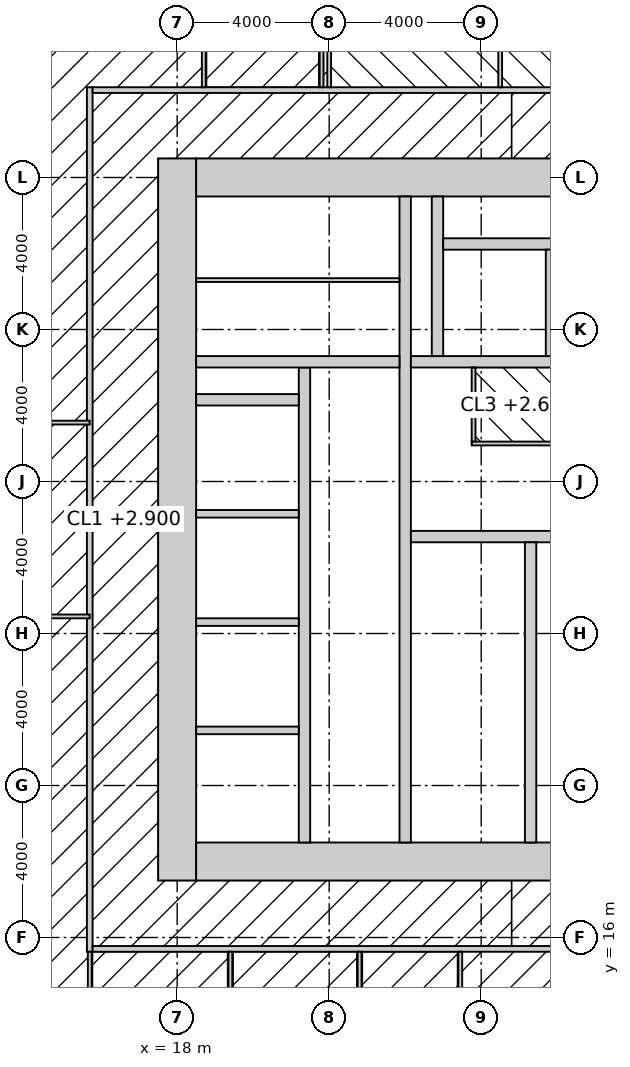
"""IFC4 building model, lengths in metres.
Left out: names, types, materials, properties, quantities, classifications, styles, units other than length and angle.
Written with IfcOpenShell. Run it as: python <this file> out.ifc"""

import sys

from ifc_helpers import new_model, si_unit, direction, frame, frame_2d, origin, place, context, subcontext, project, spatial, rectangle, extrude, element, fill, save


model = new_model("IFC4")
c1 = context("Model", 3, precision=1e-05, world=origin(), true_north=direction((0.0, 1.0)))
c2 = subcontext(c1, "Body", "Model", "MODEL_VIEW")
j1 = project(units=[si_unit("LENGTHUNIT", "METRE"), si_unit("PLANEANGLEUNIT", "RADIAN")], contexts=[c1])
p1 = place(None, origin())
s1 = spatial("IfcSite", under=j1, at=p1, CompositionType="ELEMENT")
p2 = place(p1, origin())
s2 = spatial("IfcBuilding", under=s1, at=p2, CompositionType="ELEMENT")
p3 = place(p2, frame((0.0, 0.0, 93.4)))
s3 = spatial("IfcBuildingStorey", under=s2, at=p3, CompositionType="ELEMENT", Elevation=93.4)
p4 = place(p3, frame((18.0, 17.5, -0.15), z_axis=(0.0, 0.0, 1.0), x_axis=(0.0, 1.0, 0.0)))
e1 = element("IfcWall", 1, at=p4, inside=s3, PredefinedType="SHEAR", context=c2, shape_type="SweptSolid", body=[
    extrude(rectangle(XDim=19.0, YDim=1.0, at=frame_2d((9.5, 0.0))), origin(), (0.0, 0.0, 1.0), 4.0),
])
p5 = place(p3, frame((18.5, 18.0, -0.15), z_axis=(0.0, 0.0, 1.0), x_axis=(1.0, 0.0, 0.0)))
e2 = element("IfcWall", 2, at=p5, inside=s3, PredefinedType="SHEAR", context=c2, shape_type="SweptSolid", body=[
    extrude(rectangle(XDim=17.6, YDim=1.0, at=frame_2d((8.8, 0.0))), origin(), (0.0, 0.0, 1.0), 4.0),
])
p6 = place(p5, frame((3.45, 0.0, 0.15)))
e3 = element("IfcOpeningElement", 3, at=p6, cuts=e2, PredefinedType="OPENING", context=c2, shape_type="SweptSolid", body=[
    extrude(rectangle(XDim=1.5, YDim=2.4, at=frame_2d((0.75, 1.2))), frame((0.0, 0.51, 0.0), z_axis=(0.0, -1.0, 0.0), x_axis=(1.0, 0.0, 0.0)), (0.0, 0.0, 1.0), 1.02),
])
p7 = place(p3, frame((18.5, 36.0, -0.15), z_axis=(0.0, 0.0, 1.0), x_axis=(1.0, 0.0, 0.0)))
e4 = element("IfcWall", 4, at=p7, inside=s3, PredefinedType="SHEAR", context=c2, shape_type="SweptSolid", body=[
    extrude(rectangle(XDim=17.6, YDim=1.0, at=frame_2d((8.8, 0.0))), origin(), (0.0, 0.0, 1.0), 4.0),
])
p8 = place(p3, frame((24.0, 18.5, -0.15), z_axis=(0.0, 0.0, 1.0), x_axis=(0.0, 1.0, 0.0)))
e5 = element("IfcWall", 5, at=p8, inside=s3, PredefinedType="SHEAR", context=c2, shape_type="SweptSolid", body=[
    extrude(rectangle(XDim=17.0, YDim=0.3, at=frame_2d((8.5, 0.0))), origin(), (0.0, 0.0, 1.0), 4.0),
])
p9 = place(p8, frame((9.6, 0.0, 0.15)))
e6 = element("IfcOpeningElement", 6, at=p9, cuts=e5, PredefinedType="OPENING", context=c2, shape_type="SweptSolid", body=[
    extrude(rectangle(XDim=1.5, YDim=2.4, at=frame_2d((0.75, 1.2))), frame((0.0, 0.16, 0.0), z_axis=(0.0, -1.0, 0.0), x_axis=(1.0, 0.0, 0.0)), (0.0, 0.0, 1.0), 0.32),
])
p10 = place(p3, frame((24.15, 26.55, -0.15), z_axis=(0.0, 0.0, 1.0), x_axis=(1.0, 0.0, 0.0)))
e7 = element("IfcWall", 7, at=p10, inside=s3, PredefinedType="SHEAR", context=c2, shape_type="SweptSolid", body=[
    extrude(rectangle(XDim=11.25, YDim=0.3, at=frame_2d((5.625, 0.0))), origin(), (0.0, 0.0, 1.0), 4.0),
])
p11 = place(p10, frame((9.25, 0.0, 0.15)))
e8 = element("IfcOpeningElement", 8, at=p11, cuts=e7, PredefinedType="OPENING", context=c2, shape_type="SweptSolid", body=[
    extrude(rectangle(XDim=1.0, YDim=2.2, at=frame_2d((0.5, 1.1))), frame((0.0, 0.16, 0.0), z_axis=(0.0, -1.0, 0.0), x_axis=(1.0, 0.0, 0.0)), (0.0, 0.0, 1.0), 0.32),
])
p12 = place(p10, frame((4.9, 0.0, 0.15)))
e9 = element("IfcOpeningElement", 9, at=p12, cuts=e7, PredefinedType="OPENING", context=c2, shape_type="SweptSolid", body=[
    extrude(rectangle(XDim=1.5, YDim=2.4, at=frame_2d((0.75, 1.2))), frame((0.0, 0.16, 0.0), z_axis=(0.0, -1.0, 0.0), x_axis=(1.0, 0.0, 0.0)), (0.0, 0.0, 1.0), 0.32),
])
p13 = place(p3, frame((27.3, 18.5, -0.15), z_axis=(0.0, 0.0, 1.0), x_axis=(0.0, 1.0, 0.0)))
e10 = element("IfcWall", 10, at=p13, inside=s3, PredefinedType="SHEAR", context=c2, shape_type="SweptSolid", body=[
    extrude(rectangle(XDim=7.9, YDim=0.3, at=frame_2d((3.95, 0.0))), origin(), (0.0, 0.0, 1.0), 4.0),
])
p14 = place(p13, frame((6.4, 0.0, 0.15)))
e11 = element("IfcOpeningElement", 11, at=p14, cuts=e10, PredefinedType="OPENING", context=c2, shape_type="SweptSolid", body=[
    extrude(rectangle(XDim=1.0, YDim=2.2, at=frame_2d((0.5, 1.1))), frame((0.0, 0.16, 0.0), z_axis=(0.0, -1.0, 0.0), x_axis=(1.0, 0.0, 0.0)), (0.0, 0.0, 1.0), 0.32),
])
p15 = place(p3, frame((24.15, 31.15, -0.15), z_axis=(0.0, 0.0, 1.0), x_axis=(1.0, 0.0, 0.0)))
e12 = element("IfcWall", 12, at=p15, inside=s3, PredefinedType="SHEAR", context=c2, shape_type="SweptSolid", body=[
    extrude(rectangle(XDim=11.25, YDim=0.3, at=frame_2d((5.625, 0.0))), origin(), (0.0, 0.0, 1.0), 4.0),
])
p16 = place(p15, frame((7.25, 0.0, 0.15)))
e13 = element("IfcOpeningElement", 13, at=p16, cuts=e12, PredefinedType="OPENING", context=c2, shape_type="SweptSolid", body=[
    extrude(rectangle(XDim=1.4, YDim=2.4, at=frame_2d((0.7, 1.2))), frame((0.0, 0.16, 0.0), z_axis=(0.0, -1.0, 0.0), x_axis=(1.0, 0.0, 0.0)), (0.0, 0.0, 1.0), 0.32),
])
p17 = place(p3, frame((21.35, 18.5, -0.15), z_axis=(0.0, 0.0, 1.0), x_axis=(0.0, 1.0, 0.0)))
e14 = element("IfcWall", 14, at=p17, inside=s3, PredefinedType="SHEAR", context=c2, shape_type="SweptSolid", body=[
    extrude(rectangle(XDim=12.5, YDim=0.3, at=frame_2d((6.25, 0.0))), origin(), (0.0, 0.0, 1.0), 4.0),
])
p18 = place(p17, frame((0.875, 0.0, 0.15)))
e15 = element("IfcOpeningElement", 15, at=p18, cuts=e14, PredefinedType="OPENING", context=c2, shape_type="SweptSolid", body=[
    extrude(rectangle(XDim=1.1, YDim=2.2, at=frame_2d((0.55, 1.1))), frame((0.0, 0.16, 0.0), z_axis=(0.0, -1.0, 0.0), x_axis=(1.0, 0.0, 0.0)), (0.0, 0.0, 1.0), 0.32),
])
p19 = place(p17, frame((3.825, 0.0, 0.15)))
e16 = element("IfcOpeningElement", 16, at=p19, cuts=e14, PredefinedType="OPENING", context=c2, shape_type="SweptSolid", body=[
    extrude(rectangle(XDim=1.1, YDim=2.2, at=frame_2d((0.55, 1.1))), frame((0.0, 0.16, 0.0), z_axis=(0.0, -1.0, 0.0), x_axis=(1.0, 0.0, 0.0)), (0.0, 0.0, 1.0), 0.32),
])
p20 = place(p17, frame((6.675, 0.0, 0.15)))
e17 = element("IfcOpeningElement", 17, at=p20, cuts=e14, PredefinedType="OPENING", context=c2, shape_type="SweptSolid", body=[
    extrude(rectangle(XDim=1.1, YDim=2.2, at=frame_2d((0.55, 1.1))), frame((0.0, 0.16, 0.0), z_axis=(0.0, -1.0, 0.0), x_axis=(1.0, 0.0, 0.0)), (0.0, 0.0, 1.0), 0.32),
])
p21 = place(p17, frame((9.575, 0.0, 0.15)))
e18 = element("IfcOpeningElement", 18, at=p21, cuts=e14, PredefinedType="OPENING", context=c2, shape_type="SweptSolid", body=[
    extrude(rectangle(XDim=1.1, YDim=2.2, at=frame_2d((0.55, 1.1))), frame((0.0, 0.16, 0.0), z_axis=(0.0, -1.0, 0.0), x_axis=(1.0, 0.0, 0.0)), (0.0, 0.0, 1.0), 0.32),
])
p22 = place(p3, frame((18.5, 31.15, -0.15), z_axis=(0.0, 0.0, 1.0), x_axis=(1.0, 0.0, 0.0)))
e19 = element("IfcWall", 19, at=p22, inside=s3, PredefinedType="SHEAR", context=c2, shape_type="SweptSolid", body=[
    extrude(rectangle(XDim=5.35, YDim=0.3, at=frame_2d((2.675, 0.0))), origin(), (0.0, 0.0, 1.0), 4.0),
])
p23 = place(p22, frame((3.4, 0.0, 0.15)))
e20 = element("IfcOpeningElement", 20, at=p23, cuts=e19, PredefinedType="OPENING", context=c2, shape_type="SweptSolid", body=[
    extrude(rectangle(XDim=1.0, YDim=2.2, at=frame_2d((0.5, 1.1))), frame((0.0, 0.16, 0.0), z_axis=(0.0, -1.0, 0.0), x_axis=(1.0, 0.0, 0.0)), (0.0, 0.0, 1.0), 0.32),
])
p24 = place(p3, frame((18.5, 30.15, -0.15), z_axis=(0.0, 0.0, 1.0), x_axis=(1.0, 0.0, 0.0)))
e21 = element("IfcWall", 21, at=p24, inside=s3, PredefinedType="SHEAR", context=c2, shape_type="SweptSolid", body=[
    extrude(rectangle(XDim=2.7, YDim=0.3, at=frame_2d((1.35, 0.0))), origin(), (0.0, 0.0, 1.0), 4.0),
])
p25 = place(p3, frame((24.85, 31.3, -0.15), z_axis=(0.0, 0.0, 1.0), x_axis=(0.0, 1.0, 0.0)))
e22 = element("IfcWall", 22, at=p25, inside=s3, PredefinedType="SHEAR", context=c2, shape_type="SweptSolid", body=[
    extrude(rectangle(XDim=4.2, YDim=0.3, at=frame_2d((2.1, 0.0))), origin(), (0.0, 0.0, 1.0), 4.0),
])
p26 = place(p3, frame((25.0, 34.25, -0.15), z_axis=(0.0, 0.0, 1.0), x_axis=(1.0, 0.0, 0.0)))
e23 = element("IfcWall", 23, at=p26, inside=s3, PredefinedType="SHEAR", context=c2, shape_type="SweptSolid", body=[
    extrude(rectangle(XDim=8.6, YDim=0.3, at=frame_2d((4.3, 0.0))), origin(), (0.0, 0.0, 1.0), 4.0),
])
p27 = place(p3, frame((27.8, 31.3, -0.15), z_axis=(0.0, 0.0, 1.0), x_axis=(0.0, 1.0, 0.0)))
e24 = element("IfcWall", 24, at=p27, inside=s3, PredefinedType="SOLIDWALL", context=c2, shape_type="SweptSolid", body=[
    extrude(rectangle(XDim=2.8, YDim=0.2, at=frame_2d((1.4, 0.0))), origin(), (0.0, 0.0, 1.0), 4.0),
])
for number, where, z_axis, x_axis in (
    (25, (18.5, 21.45, -0.15), (0.0, 0.0, 1.0), (1.0, 0.0, 0.0)),
    (26, (18.5, 24.3, -0.15), (0.0, 0.0, 1.0), (1.0, 0.0, 0.0)),
    (27, (18.5, 27.15, -0.15), (0.0, 0.0, 1.0), (1.0, 0.0, 0.0)),
):
    element("IfcWall", number, at=place(p3, frame(where, z_axis=z_axis, x_axis=x_axis)), inside=s3, PredefinedType="SOLIDWALL", context=c2, shape_type="SweptSolid", body=[
        extrude(rectangle(XDim=2.7, YDim=0.2, at=frame_2d((1.35, 0.0))), origin(), (0.0, 0.0, 1.0), 4.0),
    ])
p28 = place(p3, frame((18.5, 33.3, 0.0), z_axis=(0.0, 0.0, 1.0), x_axis=(1.0, 0.0, 0.0)))
e28 = element("IfcWall", 28, at=p28, inside=s3, PredefinedType="PARTITIONING", context=c2, shape_type="SweptSolid", body=[
    extrude(rectangle(XDim=5.35, YDim=0.1, at=frame_2d((2.675, 0.0))), origin(), (0.0, 0.0, 1.0), 3.85),
])
p29 = place(p28, frame((1.2, 0.0, 0.0)))
e29 = element("IfcOpeningElement", 29, at=p29, cuts=e28, PredefinedType="OPENING", context=c2, shape_type="SweptSolid", body=[
    extrude(rectangle(XDim=1.0, YDim=2.2, at=frame_2d((0.5, 1.1))), frame((0.0, 0.06, 0.0), z_axis=(0.0, -1.0, 0.0), x_axis=(1.0, 0.0, 0.0)), (0.0, 0.0, 1.0), 0.12),
])
p30 = place(p3, frame((25.75, 29.0, 0.0), z_axis=(0.0, 0.0, 1.0), x_axis=(1.0, 0.0, 0.0)))
e30 = element("IfcWall", 30, at=p30, inside=s3, PredefinedType="PARTITIONING", context=c2, shape_type="SweptSolid", body=[
    extrude(rectangle(XDim=4.7, YDim=0.1, at=frame_2d((2.35, 0.0))), origin(), (0.0, 0.0, 1.0), 3.85),
])
p31 = place(p30, frame((0.7, 0.0, 0.0)))
e31 = element("IfcOpeningElement", 31, at=p31, cuts=e30, PredefinedType="OPENING", context=c2, shape_type="SweptSolid", body=[
    extrude(rectangle(XDim=1.0, YDim=2.2, at=frame_2d((0.5, 1.1))), frame((0.0, 0.06, 0.0), z_axis=(0.0, -1.0, 0.0), x_axis=(1.0, 0.0, 0.0)), (0.0, 0.0, 1.0), 0.12),
])
p32 = place(p30, frame((3.0, 0.0, 0.0)))
e32 = element("IfcOpeningElement", 32, at=p32, cuts=e30, PredefinedType="OPENING", context=c2, shape_type="SweptSolid", body=[
    extrude(rectangle(XDim=1.0, YDim=2.2, at=frame_2d((0.5, 1.1))), frame((0.0, 0.06, 0.0), z_axis=(0.0, -1.0, 0.0), x_axis=(1.0, 0.0, 0.0)), (0.0, 0.0, 1.0), 0.12),
])
p33 = place(p3, frame((25.8, 29.05, 0.0), z_axis=(0.0, 0.0, 1.0), x_axis=(0.0, 1.0, 0.0)))
e33 = element("IfcWall", 33, at=p33, inside=s3, PredefinedType="PARTITIONING", context=c2, shape_type="SweptSolid", body=[
    extrude(rectangle(XDim=1.95, YDim=0.1, at=frame_2d((0.975, 0.0))), origin(), (0.0, 0.0, 1.0), 3.85),
])
p34 = place(p3, frame((15.7, 15.625, 0.0), z_axis=(0.0, 0.0, 1.0), x_axis=(0.0, 1.0, 0.0)))
e34 = element("IfcWall", 34, at=p34, inside=s3, PredefinedType="PARTITIONING", context=c2, shape_type="SweptSolid", body=[
    extrude(rectangle(XDim=22.75, YDim=0.15, at=frame_2d((11.375, 0.0))), origin(), (0.0, 0.0, 1.0), 3.85),
])
p35 = place(p34, frame((10.475, 0.0, 0.0)))
e35 = element("IfcOpeningElement", 35, at=p35, cuts=e34, PredefinedType="OPENING", context=c2, shape_type="SweptSolid", body=[
    extrude(rectangle(XDim=1.8, YDim=2.4, at=frame_2d((0.9, 1.2))), frame((0.0, 0.085, 0.0), z_axis=(0.0, -1.0, 0.0), x_axis=(1.0, 0.0, 0.0)), (0.0, 0.0, 1.0), 0.17),
])
p36 = place(p3, frame((15.775, 15.7, 0.0), z_axis=(0.0, 0.0, 1.0), x_axis=(1.0, 0.0, 0.0)))
e36 = element("IfcWall", 36, at=p36, inside=s3, PredefinedType="PARTITIONING", context=c2, shape_type="SweptSolid", body=[
    extrude(rectangle(XDim=22.05, YDim=0.15, at=frame_2d((11.025, 0.0))), origin(), (0.0, 0.0, 1.0), 3.85),
])
p37 = place(p3, frame((15.775, 38.3, 0.0), z_axis=(0.0, 0.0, 1.0), x_axis=(1.0, 0.0, 0.0)))
e37 = element("IfcWall", 37, at=p37, inside=s3, PredefinedType="PARTITIONING", context=c2, shape_type="SweptSolid", body=[
    extrude(rectangle(XDim=22.05, YDim=0.15, at=frame_2d((11.025, 0.0))), origin(), (0.0, 0.0, 1.0), 3.85),
])
p38 = place(p37, frame((7.975, 0.0, 0.0)))
e38 = element("IfcOpeningElement", 38, at=p38, cuts=e37, PredefinedType="OPENING", context=c2, shape_type="SweptSolid", body=[
    extrude(rectangle(XDim=0.9, YDim=2.1, at=frame_2d((0.45, 1.05))), frame((0.0, 0.085, 0.0), z_axis=(0.0, -1.0, 0.0), x_axis=(1.0, 0.0, 0.0)), (0.0, 0.0, 1.0), 0.17),
])
p39 = place(p37, frame((11.725, 0.0, 0.0)))
e39 = element("IfcOpeningElement", 39, at=p39, cuts=e37, PredefinedType="OPENING", context=c2, shape_type="SweptSolid", body=[
    extrude(rectangle(XDim=1.0, YDim=2.1, at=frame_2d((0.5, 1.05))), frame((0.0, 0.085, 0.0), z_axis=(0.0, -1.0, 0.0), x_axis=(1.0, 0.0, 0.0)), (0.0, 0.0, 1.0), 0.17),
])
p40 = place(p37, frame((15.575, 0.0, 0.0)))
e40 = element("IfcOpeningElement", 40, at=p40, cuts=e37, PredefinedType="OPENING", context=c2, shape_type="SweptSolid", body=[
    extrude(rectangle(XDim=0.9, YDim=2.1, at=frame_2d((0.45, 1.05))), frame((0.0, 0.085, 0.0), z_axis=(0.0, -1.0, 0.0), x_axis=(1.0, 0.0, 0.0)), (0.0, 0.0, 1.0), 0.17),
])
p41 = place(p3, frame((22.0, 38.375, 0.0), z_axis=(0.0, 0.0, 1.0), x_axis=(0.0, 1.0, 0.0)))
e41 = element("IfcWall", 41, at=p41, inside=s3, PredefinedType="PARTITIONING", context=c2, shape_type="SweptSolid", body=[
    extrude(rectangle(XDim=3.675, YDim=0.1, at=frame_2d((1.837, 0.0))), origin(), (0.0, 0.0, 1.0), 2.95),
])
p42 = place(p3, frame((26.5, 38.375, 0.0), z_axis=(0.0, 0.0, 1.0), x_axis=(0.0, 1.0, 0.0)))
e42 = element("IfcWall", 42, at=p42, inside=s3, PredefinedType="PARTITIONING", context=c2, shape_type="SweptSolid", body=[
    extrude(rectangle(XDim=3.575, YDim=0.1, at=frame_2d((1.788, 0.0))), origin(), (0.0, 0.0, 1.0), 3.85),
])
p43 = place(p3, frame((15.7, 11.55, 0.0), z_axis=(0.0, 0.0, 1.0), x_axis=(0.0, 1.0, 0.0)))
e43 = element("IfcWall", 43, at=p43, inside=s3, PredefinedType="PARTITIONING", context=c2, shape_type="SweptSolid", body=[
    extrude(rectangle(XDim=4.075, YDim=0.1, at=frame_2d((2.038, 0.0))), origin(), (0.0, 0.0, 1.0), 3.85),
])
p44 = place(p3, frame((18.7, 38.375, 0.0), z_axis=(0.0, 0.0, 1.0), x_axis=(0.0, 1.0, 0.0)))
e44 = element("IfcWall", 44, at=p44, inside=s3, PredefinedType="PARTITIONING", context=c2, shape_type="SweptSolid", body=[
    extrude(rectangle(XDim=3.475, YDim=0.1, at=frame_2d((1.738, 0.0))), origin(), (0.0, 0.0, 1.0), 3.85),
])
p45 = place(p3, frame((19.4, 11.55, 0.0), z_axis=(0.0, 0.0, 1.0), x_axis=(0.0, 1.0, 0.0)))
e45 = element("IfcWall", 45, at=p45, inside=s3, PredefinedType="PARTITIONING", context=c2, shape_type="SweptSolid", body=[
    extrude(rectangle(XDim=4.075, YDim=0.1, at=frame_2d((2.038, 0.0))), origin(), (0.0, 0.0, 1.0), 3.85),
])
p46 = place(p3, frame((21.8, 38.375, 0.0), z_axis=(0.0, 0.0, 1.0), x_axis=(0.0, 1.0, 0.0)))
e46 = element("IfcWall", 46, at=p46, inside=s3, PredefinedType="PARTITIONING", context=c2, shape_type="SweptSolid", body=[
    extrude(rectangle(XDim=3.475, YDim=0.1, at=frame_2d((1.738, 0.0))), origin(), (0.0, 0.0, 1.0), 3.85),
])
for number, where, z_axis, x_axis in (
    (47, (22.8, 11.55, 0.0), (0.0, 0.0, 1.0), (0.0, 1.0, 0.0)),
    (48, (25.45, 11.55, 0.0), (0.0, 0.0, 1.0), (0.0, 1.0, 0.0)),
):
    element("IfcWall", number, at=place(p3, frame(where, z_axis=z_axis, x_axis=x_axis)), inside=s3, PredefinedType="PARTITIONING", context=c2, shape_type="SweptSolid", body=[
        extrude(rectangle(XDim=4.075, YDim=0.1, at=frame_2d((2.038, 0.0))), origin(), (0.0, 0.0, 1.0), 3.85),
    ])
p47 = place(p3, frame((15.7, 29.55, 0.0), z_axis=(0.0, 0.0, 1.0), x_axis=(-1.0, 0.0, 0.0)))
e49 = element("IfcWall", 49, at=p47, inside=s3, PredefinedType="PARTITIONING", context=c2, shape_type="SweptSolid", body=[
    extrude(rectangle(XDim=4.5, YDim=0.1, at=frame_2d((2.25, 0.0))), origin(), (0.0, 0.0, 1.0), 3.85),
])
p48 = place(p3, frame((11.2, 24.45, 0.0), z_axis=(0.0, 0.0, 1.0), x_axis=(1.0, 0.0, 0.0)))
e50 = element("IfcWall", 50, at=p48, inside=s3, PredefinedType="PARTITIONING", context=c2, shape_type="SweptSolid", body=[
    extrude(rectangle(XDim=4.5, YDim=0.1, at=frame_2d((2.25, 0.0))), origin(), (0.0, 0.0, 1.0), 2.95),
])
p49 = place(p14, origin())
e51 = element("IfcDoor", 51, at=p49, inside=s3, OperationType="SINGLE_SWING_RIGHT", PredefinedType="DOOR", context=c2, shape_type="SweptSolid", body=[
    extrude(rectangle(XDim=1.0, YDim=2.2, at=frame_2d((0.5, 1.1))), frame((0.0, 0.025, 0.0), z_axis=(0.0, -1.0, 0.0), x_axis=(1.0, 0.0, 0.0)), (0.0, 0.0, 1.0), 0.05),
])
fill(e11, e51)
p50 = place(p9, origin())
e52 = element("IfcDoor", 52, at=p50, inside=s3, OperationType="DOUBLE_DOOR_DOUBLE_SWING", PredefinedType="DOOR", context=c2, shape_type="SweptSolid", body=[
    extrude(rectangle(XDim=1.5, YDim=2.4, at=frame_2d((0.75, 1.2))), frame((0.0, 0.025, 0.0), z_axis=(0.0, -1.0, 0.0), x_axis=(1.0, 0.0, 0.0)), (0.0, 0.0, 1.0), 0.05),
])
fill(e6, e52)
p51 = place(p23, origin())
e53 = element("IfcDoor", 53, at=p51, inside=s3, OperationType="SINGLE_SWING_LEFT", PredefinedType="DOOR", context=c2, shape_type="SweptSolid", body=[
    extrude(rectangle(XDim=1.0, YDim=2.2, at=frame_2d((0.5, 1.1))), frame((0.0, 0.025, 0.0), z_axis=(0.0, -1.0, 0.0), x_axis=(1.0, 0.0, 0.0)), (0.0, 0.0, 1.0), 0.05),
])
fill(e20, e53)
p52 = place(p29, origin())
e54 = element("IfcDoor", 54, at=p52, inside=s3, OperationType="SINGLE_SWING_LEFT", PredefinedType="DOOR", context=c2, shape_type="SweptSolid", body=[
    extrude(rectangle(XDim=1.0, YDim=2.2, at=frame_2d((0.5, 1.1))), frame((0.0, 0.025, 0.0), z_axis=(0.0, -1.0, 0.0), x_axis=(1.0, 0.0, 0.0)), (0.0, 0.0, 1.0), 0.05),
])
fill(e29, e54)
p53 = place(p31, origin())
e55 = element("IfcDoor", 55, at=p53, inside=s3, OperationType="SINGLE_SWING_LEFT", PredefinedType="DOOR", context=c2, shape_type="SweptSolid", body=[
    extrude(rectangle(XDim=1.0, YDim=2.2, at=frame_2d((0.5, 1.1))), frame((0.0, 0.025, 0.0), z_axis=(0.0, -1.0, 0.0), x_axis=(1.0, 0.0, 0.0)), (0.0, 0.0, 1.0), 0.05),
])
fill(e31, e55)
p54 = place(p6, origin())
e56 = element("IfcDoor", 56, at=p54, inside=s3, OperationType="DOUBLE_DOOR_DOUBLE_SWING", PredefinedType="DOOR", context=c2, shape_type="SweptSolid", body=[
    extrude(rectangle(XDim=1.5, YDim=2.4, at=frame_2d((0.75, 1.2))), frame((0.0, 0.025, 0.0), z_axis=(0.0, -1.0, 0.0), x_axis=(1.0, 0.0, 0.0)), (0.0, 0.0, 1.0), 0.05),
])
fill(e3, e56)
p55 = place(p38, origin())
e57 = element("IfcDoor", 57, at=p55, inside=s3, OperationType="SINGLE_SWING_LEFT", PredefinedType="DOOR", context=c2, shape_type="SweptSolid", body=[
    extrude(rectangle(XDim=0.9, YDim=2.1, at=frame_2d((0.45, 1.05))), frame((0.0, 0.025, 0.0), z_axis=(0.0, -1.0, 0.0), x_axis=(1.0, 0.0, 0.0)), (0.0, 0.0, 1.0), 0.05),
])
fill(e38, e57)
p56 = place(p39, origin())
e58 = element("IfcDoor", 58, at=p56, inside=s3, OperationType="SLIDING_TO_LEFT", PredefinedType="DOOR", context=c2, shape_type="SweptSolid", body=[
    extrude(rectangle(XDim=1.0, YDim=2.1, at=frame_2d((0.5, 1.05))), frame((0.0, 0.025, 0.0), z_axis=(0.0, -1.0, 0.0), x_axis=(1.0, 0.0, 0.0)), (0.0, 0.0, 1.0), 0.05),
])
fill(e39, e58)
p57 = place(p35, origin())
e59 = element("IfcDoor", 59, at=p57, inside=s3, OperationType="DOUBLE_DOOR_DOUBLE_SWING", PredefinedType="DOOR", context=c2, shape_type="SweptSolid", body=[
    extrude(rectangle(XDim=1.8, YDim=2.4, at=frame_2d((0.9, 1.2))), frame((0.0, 0.025, 0.0), z_axis=(0.0, -1.0, 0.0), x_axis=(1.0, 0.0, 0.0)), (0.0, 0.0, 1.0), 0.05),
])
fill(e35, e59)
p58 = place(p18, origin())
e60 = element("IfcDoor", 60, at=p58, inside=s3, OperationType="DOUBLE_DOOR_SLIDING", PredefinedType="DOOR", context=c2, shape_type="SweptSolid", body=[
    extrude(rectangle(XDim=1.1, YDim=2.2, at=frame_2d((0.55, 1.1))), frame((0.0, 0.025, 0.0), z_axis=(0.0, -1.0, 0.0), x_axis=(1.0, 0.0, 0.0)), (0.0, 0.0, 1.0), 0.05),
])
fill(e15, e60)
p59 = place(p19, origin())
e61 = element("IfcDoor", 61, at=p59, inside=s3, OperationType="DOUBLE_DOOR_SLIDING", PredefinedType="DOOR", context=c2, shape_type="SweptSolid", body=[
    extrude(rectangle(XDim=1.1, YDim=2.2, at=frame_2d((0.55, 1.1))), frame((0.0, 0.025, 0.0), z_axis=(0.0, -1.0, 0.0), x_axis=(1.0, 0.0, 0.0)), (0.0, 0.0, 1.0), 0.05),
])
fill(e16, e61)
p60 = place(p20, origin())
e62 = element("IfcDoor", 62, at=p60, inside=s3, OperationType="DOUBLE_DOOR_SLIDING", PredefinedType="DOOR", context=c2, shape_type="SweptSolid", body=[
    extrude(rectangle(XDim=1.1, YDim=2.2, at=frame_2d((0.55, 1.1))), frame((0.0, 0.025, 0.0), z_axis=(0.0, -1.0, 0.0), x_axis=(1.0, 0.0, 0.0)), (0.0, 0.0, 1.0), 0.05),
])
fill(e17, e62)
p61 = place(p21, origin())
e63 = element("IfcDoor", 63, at=p61, inside=s3, OperationType="DOUBLE_DOOR_SLIDING", PredefinedType="DOOR", context=c2, shape_type="SweptSolid", body=[
    extrude(rectangle(XDim=1.1, YDim=2.2, at=frame_2d((0.55, 1.1))), frame((0.0, 0.025, 0.0), z_axis=(0.0, -1.0, 0.0), x_axis=(1.0, 0.0, 0.0)), (0.0, 0.0, 1.0), 0.05),
])
fill(e18, e63)
save(model, sys.argv[1])
